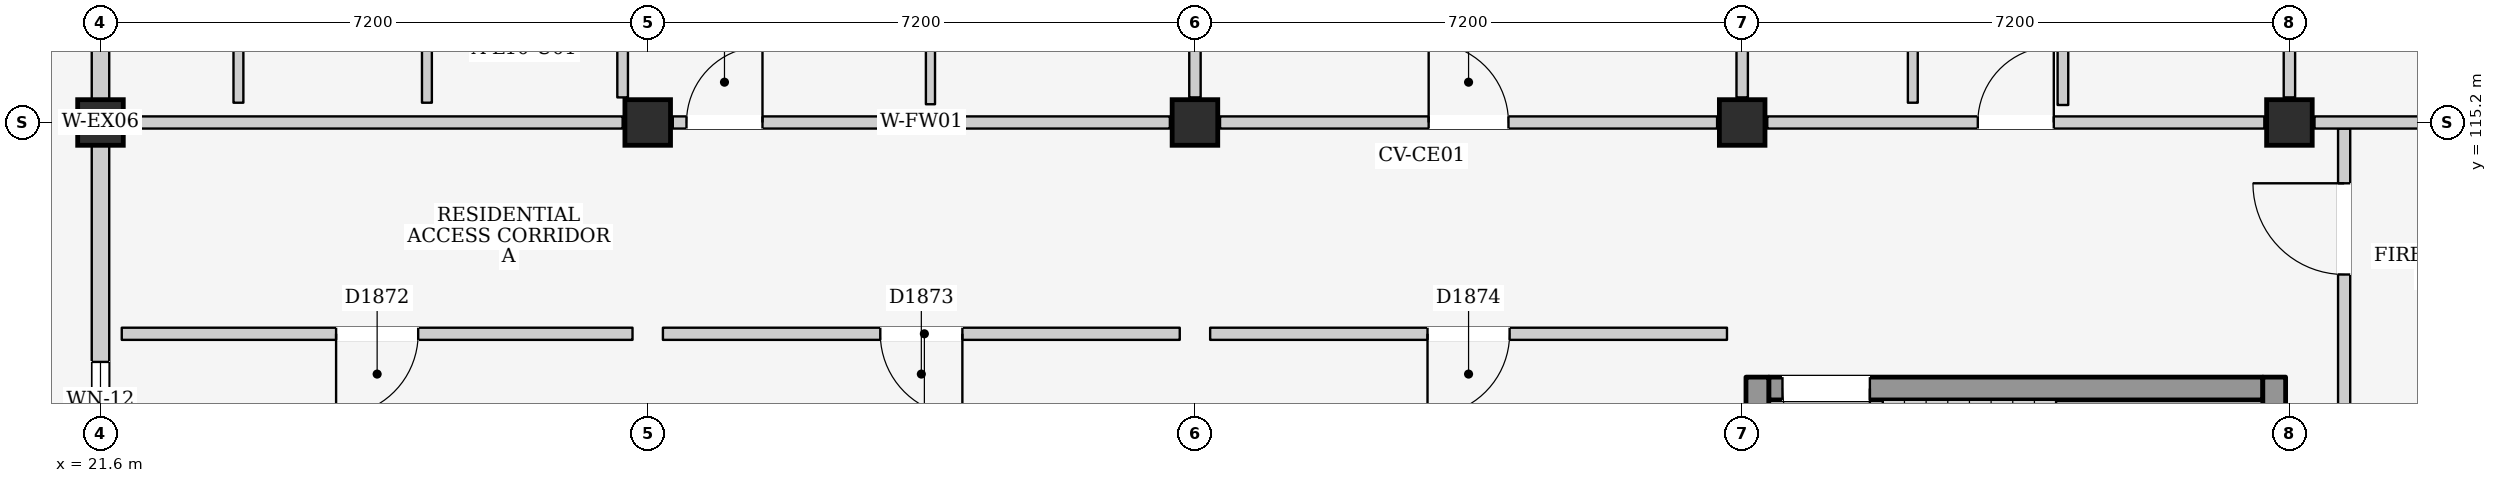
"""IFC4 building model, lengths in metres.
Left out: names, types, materials, properties, quantities, classifications, styles, units other than length and angle.
Written with IfcOpenShell. Run it as: python <this file> out.ifc"""

import sys

from ifc_helpers import new_model, si_unit, direction, frame, frame_2d, origin, origin_2d, place, context, subcontext, project, spatial, rectangle, extrude, element, fill, save


model = new_model("IFC4")
c1 = context("Model", 3, precision=1e-05, world=origin(), true_north=direction((0.0, 1.0)))
c2 = subcontext(c1, "Body", "Model", "MODEL_VIEW")
j1 = project(units=[si_unit("LENGTHUNIT", "METRE"), si_unit("PLANEANGLEUNIT", "RADIAN")], contexts=[c1])
p1 = place(None, origin())
s1 = spatial("IfcSite", under=j1, at=p1, CompositionType="ELEMENT")
p2 = place(p1, origin())
s2 = spatial("IfcBuilding", under=s1, at=p2, CompositionType="ELEMENT")
p3 = place(p2, frame((0.0, 0.0, 34.8)))
s3 = spatial("IfcBuildingStorey", under=s2, at=p3, CompositionType="ELEMENT", Elevation=34.8)
for number, where, z_axis, x_axis in (
    (1, (21.6, 115.2, 0.0), (0.0, 0.0, 1.0), (1.0, 0.0, 0.0)),
    (2, (28.8, 115.2, 0.0), (0.0, 0.0, 1.0), (1.0, 0.0, 0.0)),
    (3, (36.0, 115.2, 0.0), (0.0, 0.0, 1.0), (1.0, 0.0, 0.0)),
    (4, (43.2, 115.2, 0.0), (0.0, 0.0, 1.0), (1.0, 0.0, 0.0)),
    (5, (50.4, 115.2, 0.0), (0.0, 0.0, 1.0), (1.0, 0.0, 0.0)),
):
    element("IfcColumn", number, at=place(p3, frame(where, z_axis=z_axis, x_axis=x_axis)), inside=s3, PredefinedType="COLUMN", context=c2, shape_type="SweptSolid", body=[
        extrude(rectangle(XDim=0.6, YDim=0.6, at=origin_2d()), origin(), (0.0, 0.0, 1.0), 3.2),
    ])
p4 = place(p3, frame((21.6, 108.3, 0.0), z_axis=(0.0, 0.0, 1.0), x_axis=(0.0, 1.0, 0.0)))
e6 = element("IfcWall", 6, at=p4, inside=s3, PredefinedType="ELEMENTEDWALL", context=c2, shape_type="SweptSolid", body=[
    extrude(rectangle(XDim=6.6, YDim=0.23, at=frame_2d((3.3, 0.0))), origin(), (0.0, 0.0, 1.0), 2.445),
])
p5 = place(p4, frame((2.75, 0.0, 1.1)))
e7 = element("IfcOpeningElement", 7, at=p5, cuts=e6, PredefinedType="OPENING", context=c2, shape_type="SweptSolid", body=[
    extrude(rectangle(XDim=1.0, YDim=0.9, at=frame_2d((0.5, 0.45))), frame((0.0, 0.13, 0.0), z_axis=(0.0, -1.0, 0.0), x_axis=(1.0, 0.0, 0.0)), (0.0, 0.0, 1.0), 0.26),
])
p6 = place(p3, frame((21.6, 115.5, 0.0), z_axis=(0.0, 0.0, 1.0), x_axis=(0.0, 1.0, 0.0)))
e8 = element("IfcWall", 8, at=p6, inside=s3, PredefinedType="ELEMENTEDWALL", context=c2, shape_type="SweptSolid", body=[
    extrude(rectangle(XDim=6.6, YDim=0.23, at=frame_2d((3.3, 0.0))), origin(), (0.0, 0.0, 1.0), 2.445),
])
p7 = place(p6, frame((3.6, 0.0, 0.0)))
e9 = element("IfcOpeningElement", 9, at=p7, cuts=e8, PredefinedType="OPENING", context=c2, shape_type="SweptSolid", body=[
    extrude(rectangle(XDim=1.08, YDim=2.12, at=frame_2d((0.54, 1.06))), frame((0.0, 0.13, 0.0), z_axis=(0.0, -1.0, 0.0), x_axis=(1.0, 0.0, 0.0)), (0.0, 0.0, 1.0), 0.26),
])
p8 = place(p3, frame((43.55, 111.7, 0.0), z_axis=(0.0, 0.0, 1.0), x_axis=(1.0, 0.0, 0.0)))
e10 = element("IfcWall", 10, at=p8, inside=s3, PredefinedType="SHEAR", context=c2, shape_type="SweptSolid", body=[
    extrude(rectangle(XDim=6.5, YDim=0.3, at=frame_2d((3.25, 0.0))), origin(), (0.0, 0.0, 1.0), 2.96),
])
p9 = place(p8, frame((0.18, 0.0, 0.0)))
e11 = element("IfcOpeningElement", 11, at=p9, cuts=e10, PredefinedType="OPENING", context=c2, shape_type="SweptSolid", body=[
    extrude(rectangle(XDim=1.15, YDim=2.2, at=frame_2d((0.575, 1.1))), frame((0.0, 0.165, 0.0), z_axis=(0.0, -1.0, 0.0), x_axis=(1.0, 0.0, 0.0)), (0.0, 0.0, 1.0), 0.33),
])
for number, where, z_axis, x_axis in (
    (12, (43.4, 108.15, 0.0), (0.0, 0.0, 1.0), (0.0, 1.0, 0.0)),
    (13, (50.2, 108.15, 0.0), (0.0, 0.0, 1.0), (0.0, 1.0, 0.0)),
):
    element("IfcWall", number, at=place(p3, frame(where, z_axis=z_axis, x_axis=x_axis)), inside=s3, PredefinedType="SHEAR", context=c2, shape_type="SweptSolid", body=[
        extrude(rectangle(XDim=3.7, YDim=0.3, at=frame_2d((1.85, 0.0))), origin(), (0.0, 0.0, 1.0), 2.96),
    ])
p10 = place(p3, frame((51.12, 111.1, 0.0), z_axis=(0.0, 0.0, 1.0), x_axis=(0.0, 1.0, 0.0)))
e14 = element("IfcWall", 14, at=p10, inside=s3, PredefinedType="PARTITIONING", context=c2, shape_type="SweptSolid", body=[
    extrude(rectangle(XDim=4.02, YDim=0.16, at=frame_2d((2.01, 0.0))), origin(), (0.0, 0.0, 1.0), 2.96),
])
p11 = place(p10, frame((2.1, 0.0, 0.0)))
e15 = element("IfcOpeningElement", 15, at=p11, cuts=e14, PredefinedType="OPENING", context=c2, shape_type="SweptSolid", body=[
    extrude(rectangle(XDim=1.2, YDim=2.2, at=frame_2d((0.6, 1.1))), frame((0.0, 0.095, 0.0), z_axis=(0.0, -1.0, 0.0), x_axis=(1.0, 0.0, 0.0)), (0.0, 0.0, 1.0), 0.19),
])
p12 = place(p3, frame((21.93, 115.2, 0.0), z_axis=(0.0, 0.0, 1.0), x_axis=(1.0, 0.0, 0.0)))
e16 = element("IfcWall", 16, at=p12, inside=s3, PredefinedType="PARTITIONING", context=c2, shape_type="SweptSolid", body=[
    extrude(rectangle(XDim=6.54, YDim=0.16, at=frame_2d((3.27, 0.0))), origin(), (0.0, 0.0, 1.0), 2.295),
])
p13 = place(p3, frame((29.13, 115.2, 0.0), z_axis=(0.0, 0.0, 1.0), x_axis=(1.0, 0.0, 0.0)))
e17 = element("IfcWall", 17, at=p13, inside=s3, PredefinedType="PARTITIONING", context=c2, shape_type="SweptSolid", body=[
    extrude(rectangle(XDim=6.54, YDim=0.16, at=frame_2d((3.27, 0.0))), origin(), (0.0, 0.0, 1.0), 2.295),
])
p14 = place(p13, frame((0.18, 0.0, 0.0)))
e18 = element("IfcOpeningElement", 18, at=p14, cuts=e17, PredefinedType="OPENING", context=c2, shape_type="SweptSolid", body=[
    extrude(rectangle(XDim=1.0, YDim=2.15, at=frame_2d((0.5, 1.075))), frame((0.0, 0.095, 0.0), z_axis=(0.0, -1.0, 0.0), x_axis=(1.0, 0.0, 0.0)), (0.0, 0.0, 1.0), 0.19),
])
p15 = place(p3, frame((36.0, 115.53, 0.0), z_axis=(0.0, 0.0, 1.0), x_axis=(0.0, 1.0, 0.0)))
e19 = element("IfcWall", 19, at=p15, inside=s3, PredefinedType="PARTITIONING", context=c2, shape_type="SweptSolid", body=[
    extrude(rectangle(XDim=6.54, YDim=0.15, at=frame_2d((3.27, 0.0))), origin(), (0.0, 0.0, 1.0), 2.445),
])
for number, where, z_axis, x_axis in (
    (20, (25.895, 115.46, 0.0), (0.0, 0.0, 1.0), (0.0, 1.0, 0.0)),
    (21, (23.415, 115.46, 0.0), (0.0, 0.0, 1.0), (0.0, 1.0, 0.0)),
):
    element("IfcWall", number, at=place(p3, frame(where, z_axis=z_axis, x_axis=x_axis)), inside=s3, PredefinedType="PARTITIONING", context=c2, shape_type="SweptSolid", body=[
        extrude(rectangle(XDim=3.04, YDim=0.13, at=frame_2d((1.52, 0.0))), origin(), (0.0, 0.0, 1.0), 2.96),
    ])
p16 = place(p3, frame((28.47, 115.53, 0.0), z_axis=(0.0, 0.0, 1.0), x_axis=(0.0, 1.0, 0.0)))
e22 = element("IfcWall", 22, at=p16, inside=s3, PredefinedType="PARTITIONING", context=c2, shape_type="SweptSolid", body=[
    extrude(rectangle(XDim=2.96, YDim=0.14, at=frame_2d((1.48, 0.0))), origin(), (0.0, 0.0, 1.0), 2.96),
])
p17 = place(p3, frame((32.52, 115.44, 0.0), z_axis=(0.0, 0.0, 1.0), x_axis=(0.0, 1.0, 0.0)))
e23 = element("IfcWall", 23, at=p17, inside=s3, PredefinedType="PARTITIONING", context=c2, shape_type="SweptSolid", body=[
    extrude(rectangle(XDim=3.04, YDim=0.12, at=frame_2d((1.52, 0.0))), origin(), (0.0, 0.0, 1.0), 2.96),
])
p18 = place(p17, frame((1.04, 0.0, 0.0)))
e24 = element("IfcOpeningElement", 24, at=p18, cuts=e23, PredefinedType="OPENING", context=c2, shape_type="SweptSolid", body=[
    extrude(rectangle(XDim=0.96, YDim=2.15, at=frame_2d((0.48, 1.075))), frame((0.0, 0.075, 0.0), z_axis=(0.0, -1.0, 0.0), x_axis=(1.0, 0.0, 0.0)), (0.0, 0.0, 1.0), 0.15),
])
p19 = place(p3, frame((36.33, 115.2, 0.0), z_axis=(0.0, 0.0, 1.0), x_axis=(1.0, 0.0, 0.0)))
e25 = element("IfcWall", 25, at=p19, inside=s3, PredefinedType="PARTITIONING", context=c2, shape_type="SweptSolid", body=[
    extrude(rectangle(XDim=6.54, YDim=0.16, at=frame_2d((3.27, 0.0))), origin(), (0.0, 0.0, 1.0), 2.295),
])
p20 = place(p19, frame((2.745, 0.0, 0.0)))
e26 = element("IfcOpeningElement", 26, at=p20, cuts=e25, PredefinedType="OPENING", context=c2, shape_type="SweptSolid", body=[
    extrude(rectangle(XDim=1.05, YDim=2.15, at=frame_2d((0.525, 1.075))), frame((0.0, 0.095, 0.0), z_axis=(0.0, -1.0, 0.0), x_axis=(1.0, 0.0, 0.0)), (0.0, 0.0, 1.0), 0.19),
])
p21 = place(p3, frame((43.2, 115.53, 0.0), z_axis=(0.0, 0.0, 1.0), x_axis=(0.0, 1.0, 0.0)))
e27 = element("IfcWall", 27, at=p21, inside=s3, PredefinedType="PARTITIONING", context=c2, shape_type="SweptSolid", body=[
    extrude(rectangle(XDim=6.54, YDim=0.15, at=frame_2d((3.27, 0.0))), origin(), (0.0, 0.0, 1.0), 2.445),
])
p22 = place(p3, frame((43.53, 115.2, 0.0), z_axis=(0.0, 0.0, 1.0), x_axis=(1.0, 0.0, 0.0)))
e28 = element("IfcWall", 28, at=p22, inside=s3, PredefinedType="PARTITIONING", context=c2, shape_type="SweptSolid", body=[
    extrude(rectangle(XDim=6.54, YDim=0.16, at=frame_2d((3.27, 0.0))), origin(), (0.0, 0.0, 1.0), 2.295),
])
p23 = place(p22, frame((2.77, 0.0, 0.0)))
e29 = element("IfcOpeningElement", 29, at=p23, cuts=e28, PredefinedType="OPENING", context=c2, shape_type="SweptSolid", body=[
    extrude(rectangle(XDim=1.0, YDim=2.15, at=frame_2d((0.5, 1.075))), frame((0.0, 0.095, 0.0), z_axis=(0.0, -1.0, 0.0), x_axis=(1.0, 0.0, 0.0)), (0.0, 0.0, 1.0), 0.19),
])
p24 = place(p3, frame((50.4, 115.53, 0.0), z_axis=(0.0, 0.0, 1.0), x_axis=(0.0, 1.0, 0.0)))
e30 = element("IfcWall", 30, at=p24, inside=s3, PredefinedType="PARTITIONING", context=c2, shape_type="SweptSolid", body=[
    extrude(rectangle(XDim=6.54, YDim=0.15, at=frame_2d((3.27, 0.0))), origin(), (0.0, 0.0, 1.0), 2.445),
])
p25 = place(p3, frame((45.445, 115.46, 0.0), z_axis=(0.0, 0.0, 1.0), x_axis=(0.0, 1.0, 0.0)))
e31 = element("IfcWall", 31, at=p25, inside=s3, PredefinedType="PARTITIONING", context=c2, shape_type="SweptSolid", body=[
    extrude(rectangle(XDim=2.13, YDim=0.13, at=frame_2d((1.065, 0.0))), origin(), (0.0, 0.0, 1.0), 2.96),
])
p26 = place(p3, frame((47.42, 115.43, 0.0), z_axis=(0.0, 0.0, 1.0), x_axis=(0.0, 1.0, 0.0)))
e32 = element("IfcWall", 32, at=p26, inside=s3, PredefinedType="PARTITIONING", context=c2, shape_type="SweptSolid", body=[
    extrude(rectangle(XDim=2.15, YDim=0.14, at=frame_2d((1.075, 0.0))), origin(), (0.0, 0.0, 1.0), 2.96),
])
p27 = place(p3, frame((50.73, 115.2, 0.0), z_axis=(0.0, 0.0, 1.0), x_axis=(1.0, 0.0, 0.0)))
e33 = element("IfcWall", 33, at=p27, inside=s3, PredefinedType="PARTITIONING", context=c2, shape_type="SweptSolid", body=[
    extrude(rectangle(XDim=6.54, YDim=0.16, at=frame_2d((3.27, 0.0))), origin(), (0.0, 0.0, 1.0), 2.295),
])
p28 = place(p3, frame((21.88, 112.42, 0.0), z_axis=(0.0, 0.0, 1.0), x_axis=(1.0, 0.0, 0.0)))
e34 = element("IfcWall", 34, at=p28, inside=s3, PredefinedType="PARTITIONING", context=c2, shape_type="SweptSolid", body=[
    extrude(rectangle(XDim=6.72, YDim=0.16, at=frame_2d((3.36, 0.0))), origin(), (0.0, 0.0, 1.0), 2.96),
])
p29 = place(p28, frame((2.82, 0.0, 0.0)))
e35 = element("IfcOpeningElement", 35, at=p29, cuts=e34, PredefinedType="OPENING", context=c2, shape_type="SweptSolid", body=[
    extrude(rectangle(XDim=1.08, YDim=2.22, at=frame_2d((0.54, 1.11))), frame((0.0, 0.095, 0.0), z_axis=(0.0, -1.0, 0.0), x_axis=(1.0, 0.0, 0.0)), (0.0, 0.0, 1.0), 0.19),
])
p30 = place(p3, frame((29.0, 112.42, 0.0), z_axis=(0.0, 0.0, 1.0), x_axis=(1.0, 0.0, 0.0)))
e36 = element("IfcWall", 36, at=p30, inside=s3, PredefinedType="PARTITIONING", context=c2, shape_type="SweptSolid", body=[
    extrude(rectangle(XDim=6.8, YDim=0.16, at=frame_2d((3.4, 0.0))), origin(), (0.0, 0.0, 1.0), 2.96),
])
p31 = place(p30, frame((2.86, 0.0, 0.0)))
e37 = element("IfcOpeningElement", 37, at=p31, cuts=e36, PredefinedType="OPENING", context=c2, shape_type="SweptSolid", body=[
    extrude(rectangle(XDim=1.08, YDim=2.22, at=frame_2d((0.54, 1.11))), frame((0.0, 0.095, 0.0), z_axis=(0.0, -1.0, 0.0), x_axis=(1.0, 0.0, 0.0)), (0.0, 0.0, 1.0), 0.19),
])
p32 = place(p3, frame((36.2, 112.42, 0.0), z_axis=(0.0, 0.0, 1.0), x_axis=(1.0, 0.0, 0.0)))
e38 = element("IfcWall", 38, at=p32, inside=s3, PredefinedType="PARTITIONING", context=c2, shape_type="SweptSolid", body=[
    extrude(rectangle(XDim=6.8, YDim=0.16, at=frame_2d((3.4, 0.0))), origin(), (0.0, 0.0, 1.0), 2.96),
])
p33 = place(p32, frame((2.86, 0.0, 0.0)))
e39 = element("IfcOpeningElement", 39, at=p33, cuts=e38, PredefinedType="OPENING", context=c2, shape_type="SweptSolid", body=[
    extrude(rectangle(XDim=1.08, YDim=2.22, at=frame_2d((0.54, 1.11))), frame((0.0, 0.095, 0.0), z_axis=(0.0, -1.0, 0.0), x_axis=(1.0, 0.0, 0.0)), (0.0, 0.0, 1.0), 0.19),
])
p34 = place(p5, origin())
e40 = element("IfcWindow", 40, at=p34, inside=s3, PartitioningType="SINGLE_PANEL", PredefinedType="WINDOW", context=c2, shape_type="SweptSolid", body=[
    extrude(rectangle(XDim=1.0, YDim=0.9, at=frame_2d((0.5, 0.45))), frame((0.0, 0.03, 0.0), z_axis=(0.0, -1.0, 0.0), x_axis=(1.0, 0.0, 0.0)), (0.0, 0.0, 1.0), 0.06),
])
fill(e7, e40)
p35 = place(p9, frame((1.15, 0.0, 0.0), z_axis=(0.0, 0.0, 1.0), x_axis=(-1.0, 0.0, 0.0)))
e41 = element("IfcDoor", 41, at=p35, inside=s3, OperationType="SINGLE_SWING_LEFT", PredefinedType="DOOR", context=c2, shape_type="SweptSolid", body=[
    extrude(rectangle(XDim=1.15, YDim=2.2, at=frame_2d((0.575, 1.1))), frame((0.0, 0.025, 0.0), z_axis=(0.0, -1.0, 0.0), x_axis=(1.0, 0.0, 0.0)), (0.0, 0.0, 1.0), 0.05),
])
fill(e11, e41)
p36 = place(p11, origin())
e42 = element("IfcDoor", 42, at=p36, inside=s3, OperationType="SINGLE_SWING_RIGHT", PredefinedType="DOOR", context=c2, shape_type="SweptSolid", body=[
    extrude(rectangle(XDim=1.2, YDim=2.2, at=frame_2d((0.6, 1.1))), frame((0.0, 0.025, 0.0), z_axis=(0.0, -1.0, 0.0), x_axis=(1.0, 0.0, 0.0)), (0.0, 0.0, 1.0), 0.05),
])
fill(e15, e42)
p37 = place(p14, origin())
e43 = element("IfcDoor", 43, at=p37, inside=s3, OperationType="SINGLE_SWING_RIGHT", PredefinedType="DOOR", context=c2, shape_type="SweptSolid", body=[
    extrude(rectangle(XDim=1.0, YDim=2.15, at=frame_2d((0.5, 1.075))), frame((0.0, 0.025, 0.0), z_axis=(0.0, -1.0, 0.0), x_axis=(1.0, 0.0, 0.0)), (0.0, 0.0, 1.0), 0.05),
])
fill(e18, e43)
p38 = place(p20, origin())
e44 = element("IfcDoor", 44, at=p38, inside=s3, OperationType="SINGLE_SWING_LEFT", PredefinedType="DOOR", context=c2, shape_type="SweptSolid", body=[
    extrude(rectangle(XDim=1.05, YDim=2.15, at=frame_2d((0.525, 1.075))), frame((0.0, 0.025, 0.0), z_axis=(0.0, -1.0, 0.0), x_axis=(1.0, 0.0, 0.0)), (0.0, 0.0, 1.0), 0.05),
])
fill(e26, e44)
p39 = place(p23, origin())
e45 = element("IfcDoor", 45, at=p39, inside=s3, OperationType="SINGLE_SWING_RIGHT", PredefinedType="DOOR", context=c2, shape_type="SweptSolid", body=[
    extrude(rectangle(XDim=1.0, YDim=2.15, at=frame_2d((0.5, 1.075))), frame((0.0, 0.025, 0.0), z_axis=(0.0, -1.0, 0.0), x_axis=(1.0, 0.0, 0.0)), (0.0, 0.0, 1.0), 0.05),
])
fill(e29, e45)
p40 = place(p29, frame((1.08, 0.0, 0.0), z_axis=(0.0, 0.0, 1.0), x_axis=(-1.0, 0.0, 0.0)))
e46 = element("IfcDoor", 46, at=p40, inside=s3, OperationType="SINGLE_SWING_RIGHT", PredefinedType="DOOR", context=c2, shape_type="SweptSolid", body=[
    extrude(rectangle(XDim=1.08, YDim=2.22, at=frame_2d((0.54, 1.11))), frame((0.0, 0.025, 0.0), z_axis=(0.0, -1.0, 0.0), x_axis=(1.0, 0.0, 0.0)), (0.0, 0.0, 1.0), 0.05),
])
fill(e35, e46)
p41 = place(p31, frame((1.08, 0.0, 0.0), z_axis=(0.0, 0.0, 1.0), x_axis=(-1.0, 0.0, 0.0)))
e47 = element("IfcDoor", 47, at=p41, inside=s3, OperationType="SINGLE_SWING_LEFT", PredefinedType="DOOR", context=c2, shape_type="SweptSolid", body=[
    extrude(rectangle(XDim=1.08, YDim=2.22, at=frame_2d((0.54, 1.11))), frame((0.0, 0.025, 0.0), z_axis=(0.0, -1.0, 0.0), x_axis=(1.0, 0.0, 0.0)), (0.0, 0.0, 1.0), 0.05),
])
fill(e37, e47)
p42 = place(p33, frame((1.08, 0.0, 0.0), z_axis=(0.0, 0.0, 1.0), x_axis=(-1.0, 0.0, 0.0)))
e48 = element("IfcDoor", 48, at=p42, inside=s3, OperationType="SINGLE_SWING_RIGHT", PredefinedType="DOOR", context=c2, shape_type="SweptSolid", body=[
    extrude(rectangle(XDim=1.08, YDim=2.22, at=frame_2d((0.54, 1.11))), frame((0.0, 0.025, 0.0), z_axis=(0.0, -1.0, 0.0), x_axis=(1.0, 0.0, 0.0)), (0.0, 0.0, 1.0), 0.05),
])
fill(e39, e48)
save(model, sys.argv[1])
